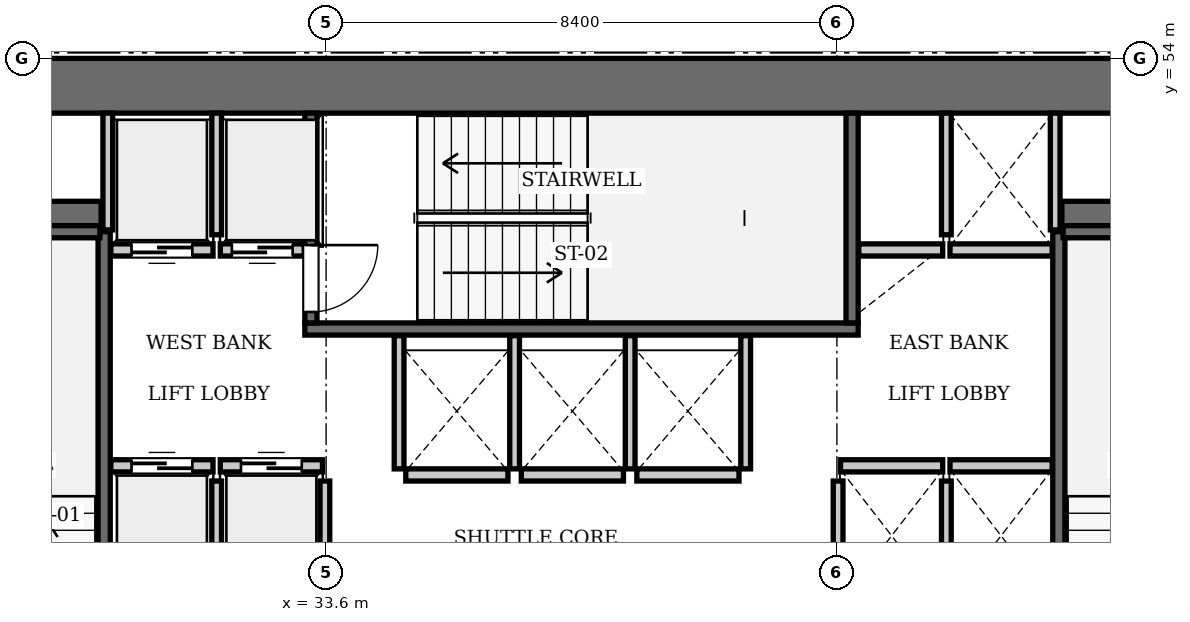
"""IFC4 building model, lengths in metres.
Left out: names, types, materials, properties, quantities, classifications, styles, units other than length and angle.
Written with IfcOpenShell. Run it as: python <this file> out.ifc"""

import sys

from ifc_helpers import new_model, si_unit, direction, frame, frame_2d, origin, place, context, subcontext, project, spatial, rectangle, extrude, element, fill, save


model = new_model("IFC4")
c1 = context("Model", 3, precision=1e-05, world=origin(), true_north=direction((0.0, 1.0)))
c2 = subcontext(c1, "Body", "Model", "MODEL_VIEW")
j1 = project(units=[si_unit("LENGTHUNIT", "METRE"), si_unit("PLANEANGLEUNIT", "RADIAN")], contexts=[c1])
p1 = place(None, origin())
s1 = spatial("IfcSite", under=j1, at=p1, CompositionType="ELEMENT")
p2 = place(p1, origin())
s2 = spatial("IfcBuilding", under=s1, at=p2, CompositionType="ELEMENT")
p3 = place(p2, frame((0.0, 0.0, 69.3)))
s3 = spatial("IfcBuildingStorey", under=s2, at=p3, CompositionType="ELEMENT", Elevation=69.3)
p4 = place(p3, frame((25.2, 53.55, 0.0), z_axis=(0.0, 0.0, 1.0), x_axis=(1.0, 0.0, 0.0)))
e1 = element("IfcWall", 1, at=p4, inside=s3, PredefinedType="SHEAR", context=c2, shape_type="SweptSolid", body=[
    extrude(rectangle(XDim=25.2, YDim=0.9, at=frame_2d((12.6, 0.0))), origin(), (0.0, 0.0, 1.0), 3.85),
])
p5 = place(p3, frame((26.1, 51.4, 0.0), z_axis=(0.0, 0.0, 1.0), x_axis=(1.0, 0.0, 0.0)))
e2 = element("IfcWall", 2, at=p5, inside=s3, PredefinedType="SHEAR", context=c2, shape_type="SweptSolid", body=[
    extrude(rectangle(XDim=3.8, YDim=0.5, at=frame_2d((1.9, 0.0))), origin(), (0.0, 0.0, 1.0), 3.85),
])
p6 = place(p3, frame((45.7, 51.4, 0.0), z_axis=(0.0, 0.0, 1.0), x_axis=(1.0, 0.0, 0.0)))
e3 = element("IfcWall", 3, at=p6, inside=s3, PredefinedType="SHEAR", context=c2, shape_type="SweptSolid", body=[
    extrude(rectangle(XDim=3.8, YDim=0.5, at=frame_2d((1.9, 0.0))), origin(), (0.0, 0.0, 1.0), 3.85),
])
p7 = place(p3, frame((29.95, 42.3, 0.0), z_axis=(0.0, 0.0, 1.0), x_axis=(0.0, 1.0, 0.0)))
e4 = element("IfcWall", 4, at=p7, inside=s3, PredefinedType="SOLIDWALL", context=c2, shape_type="SweptSolid", body=[
    extrude(rectangle(XDim=8.85, YDim=0.2, at=frame_2d((4.425, 0.0))), origin(), (0.0, 0.0, 1.0), 3.61),
])
p8 = place(p3, frame((26.38, 51.15, 0.0), z_axis=(0.0, 0.0, 1.0), x_axis=(1.0, 0.0, 0.0)))
e5 = element("IfcWall", 5, at=p8, inside=s3, PredefinedType="SOLIDWALL", context=c2, shape_type="SweptSolid", body=[
    extrude(rectangle(XDim=3.5, YDim=0.2, at=frame_2d((1.75, 0.0))), origin(), (0.0, 0.0, 1.0), 3.61),
])
p9 = place(p3, frame((33.25, 49.55, 0.0), z_axis=(0.0, 0.0, 1.0), x_axis=(1.0, 0.0, 0.0)))
e6 = element("IfcWall", 6, at=p9, inside=s3, PredefinedType="SOLIDWALL", context=c2, shape_type="SweptSolid", body=[
    extrude(rectangle(XDim=9.1, YDim=0.2, at=frame_2d((4.55, 0.0))), origin(), (0.0, 0.0, 1.0), 3.61),
])
p10 = place(p3, frame((42.25, 49.65, 0.0), z_axis=(0.0, 0.0, 1.0), x_axis=(0.0, 1.0, 0.0)))
e7 = element("IfcWall", 7, at=p10, inside=s3, PredefinedType="SOLIDWALL", context=c2, shape_type="SweptSolid", body=[
    extrude(rectangle(XDim=3.45, YDim=0.2, at=frame_2d((1.725, 0.0))), origin(), (0.0, 0.0, 1.0), 3.61),
])
p11 = place(p3, frame((33.35, 49.65, 0.0), z_axis=(0.0, 0.0, 1.0), x_axis=(0.0, 1.0, 0.0)))
e8 = element("IfcWall", 8, at=p11, inside=s3, PredefinedType="SOLIDWALL", context=c2, shape_type="SweptSolid", body=[
    extrude(rectangle(XDim=3.45, YDim=0.2, at=frame_2d((1.725, 0.0))), origin(), (0.0, 0.0, 1.0), 3.61),
])
p12 = place(p11, frame((0.18, 0.0, 0.0)))
e9 = element("IfcOpeningElement", 9, at=p12, cuts=e8, PredefinedType="OPENING", context=c2, shape_type="SweptSolid", body=[
    extrude(rectangle(XDim=1.1, YDim=2.15, at=frame_2d((0.55, 1.075))), frame((0.0, 0.11, 0.0), z_axis=(0.0, -1.0, 0.0), x_axis=(1.0, 0.0, 0.0)), (0.0, 0.0, 1.0), 0.22),
])
p13 = place(p3, frame((45.65, 42.3, 0.0), z_axis=(0.0, 0.0, 1.0), x_axis=(0.0, 1.0, 0.0)))
e10 = element("IfcWall", 10, at=p13, inside=s3, PredefinedType="SOLIDWALL", context=c2, shape_type="SweptSolid", body=[
    extrude(rectangle(XDim=8.85, YDim=0.2, at=frame_2d((4.425, 0.0))), origin(), (0.0, 0.0, 1.0), 3.61),
])
p14 = place(p3, frame((45.72, 51.15, 0.0), z_axis=(0.0, 0.0, 1.0), x_axis=(1.0, 0.0, 0.0)))
e11 = element("IfcWall", 11, at=p14, inside=s3, PredefinedType="SOLIDWALL", context=c2, shape_type="SweptSolid", body=[
    extrude(rectangle(XDim=3.5, YDim=0.2, at=frame_2d((1.75, 0.0))), origin(), (0.0, 0.0, 1.0), 3.61),
])
p15 = place(p3, frame((30.06, 47.3, 0.0), z_axis=(0.0, 0.0, 1.0), x_axis=(1.0, 0.0, 0.0)))
e12 = element("IfcWall", 12, at=p15, inside=s3, PredefinedType="SOLIDWALL", context=c2, shape_type="SweptSolid", body=[
    extrude(rectangle(XDim=1.68, YDim=0.2, at=frame_2d((0.84, 0.0))), origin(), (0.0, 0.0, 1.0), 3.61),
])
p16 = place(p15, frame((0.34, 0.0, 0.0)))
e13 = element("IfcOpeningElement", 13, at=p16, cuts=e12, PredefinedType="OPENING", context=c2, shape_type="SweptSolid", body=[
    extrude(rectangle(XDim=1.0, YDim=2.15, at=frame_2d((0.5, 1.075))), frame((0.0, 0.11, 0.0), z_axis=(0.0, -1.0, 0.0), x_axis=(1.0, 0.0, 0.0)), (0.0, 0.0, 1.0), 0.22),
])
p17 = place(p3, frame((31.86, 47.3, 0.0), z_axis=(0.0, 0.0, 1.0), x_axis=(1.0, 0.0, 0.0)))
e14 = element("IfcWall", 14, at=p17, inside=s3, PredefinedType="SOLIDWALL", context=c2, shape_type="SweptSolid", body=[
    extrude(rectangle(XDim=1.68, YDim=0.2, at=frame_2d((0.84, 0.0))), origin(), (0.0, 0.0, 1.0), 3.61),
])
p18 = place(p17, frame((0.34, 0.0, 0.0)))
e15 = element("IfcOpeningElement", 15, at=p18, cuts=e14, PredefinedType="OPENING", context=c2, shape_type="SweptSolid", body=[
    extrude(rectangle(XDim=1.0, YDim=2.15, at=frame_2d((0.5, 1.075))), frame((0.0, 0.11, 0.0), z_axis=(0.0, -1.0, 0.0), x_axis=(1.0, 0.0, 0.0)), (0.0, 0.0, 1.0), 0.22),
])
p19 = place(p3, frame((30.06, 50.85, 0.0), z_axis=(0.0, 0.0, 1.0), x_axis=(1.0, 0.0, 0.0)))
e16 = element("IfcWall", 16, at=p19, inside=s3, PredefinedType="SOLIDWALL", context=c2, shape_type="SweptSolid", body=[
    extrude(rectangle(XDim=1.68, YDim=0.2, at=frame_2d((0.84, 0.0))), origin(), (0.0, 0.0, 1.0), 3.61),
])
p20 = place(p19, frame((0.34, 0.0, 0.0)))
e17 = element("IfcOpeningElement", 17, at=p20, cuts=e16, PredefinedType="OPENING", context=c2, shape_type="SweptSolid", body=[
    extrude(rectangle(XDim=1.0, YDim=2.15, at=frame_2d((0.5, 1.075))), frame((0.0, 0.11, 0.0), z_axis=(0.0, -1.0, 0.0), x_axis=(1.0, 0.0, 0.0)), (0.0, 0.0, 1.0), 0.22),
])
p21 = place(p3, frame((31.86, 50.85, 0.0), z_axis=(0.0, 0.0, 1.0), x_axis=(1.0, 0.0, 0.0)))
e18 = element("IfcWall", 18, at=p21, inside=s3, PredefinedType="SOLIDWALL", context=c2, shape_type="SweptSolid", body=[
    extrude(rectangle(XDim=1.38, YDim=0.2, at=frame_2d((0.69, 0.0))), origin(), (0.0, 0.0, 1.0), 3.61),
])
p22 = place(p21, frame((0.19, 0.0, 0.0)))
e19 = element("IfcOpeningElement", 19, at=p22, cuts=e18, PredefinedType="OPENING", context=c2, shape_type="SweptSolid", body=[
    extrude(rectangle(XDim=1.0, YDim=2.15, at=frame_2d((0.5, 1.075))), frame((0.0, 0.11, 0.0), z_axis=(0.0, -1.0, 0.0), x_axis=(1.0, 0.0, 0.0)), (0.0, 0.0, 1.0), 0.22),
])
for number, where, z_axis, x_axis in (
    (20, (42.06, 47.3, 0.0), (0.0, 0.0, 1.0), (1.0, 0.0, 0.0)),
    (21, (43.86, 47.3, 0.0), (0.0, 0.0, 1.0), (1.0, 0.0, 0.0)),
):
    element("IfcWall", number, at=place(p3, frame(where, z_axis=z_axis, x_axis=x_axis)), inside=s3, PredefinedType="SOLIDWALL", context=c2, shape_type="SweptSolid", body=[
        extrude(rectangle(XDim=1.68, YDim=0.2, at=frame_2d((0.84, 0.0))), origin(), (0.0, 0.0, 1.0), 3.61),
    ])
p23 = place(p3, frame((42.36, 50.85, 0.0), z_axis=(0.0, 0.0, 1.0), x_axis=(1.0, 0.0, 0.0)))
e22 = element("IfcWall", 22, at=p23, inside=s3, PredefinedType="SOLIDWALL", context=c2, shape_type="SweptSolid", body=[
    extrude(rectangle(XDim=1.38, YDim=0.2, at=frame_2d((0.69, 0.0))), origin(), (0.0, 0.0, 1.0), 3.61),
])
p24 = place(p3, frame((43.86, 50.85, 0.0), z_axis=(0.0, 0.0, 1.0), x_axis=(1.0, 0.0, 0.0)))
e23 = element("IfcWall", 23, at=p24, inside=s3, PredefinedType="SOLIDWALL", context=c2, shape_type="SweptSolid", body=[
    extrude(rectangle(XDim=1.68, YDim=0.2, at=frame_2d((0.84, 0.0))), origin(), (0.0, 0.0, 1.0), 3.61),
])
p25 = place(p3, frame((34.91, 47.15, 0.0), z_axis=(0.0, 0.0, 1.0), x_axis=(1.0, 0.0, 0.0)))
e24 = element("IfcWall", 24, at=p25, inside=s3, PredefinedType="SOLIDWALL", context=c2, shape_type="SweptSolid", body=[
    extrude(rectangle(XDim=1.68, YDim=0.2, at=frame_2d((0.84, 0.0))), origin(), (0.0, 0.0, 1.0), 3.61),
])
for number, where, z_axis, x_axis in (
    (25, (36.81, 47.15, 0.0), (0.0, 0.0, 1.0), (1.0, 0.0, 0.0)),
    (26, (38.71, 47.15, 0.0), (0.0, 0.0, 1.0), (1.0, 0.0, 0.0)),
):
    element("IfcWall", number, at=place(p3, frame(where, z_axis=z_axis, x_axis=x_axis)), inside=s3, PredefinedType="SOLIDWALL", context=c2, shape_type="SweptSolid", body=[
        extrude(rectangle(XDim=1.68, YDim=0.2, at=frame_2d((0.84, 0.0))), origin(), (0.0, 0.0, 1.0), 3.61),
    ])
for number, where, z_axis, x_axis in (
    (27, (31.8, 45.1, 0.0), (0.0, 0.0, 1.0), (0.0, 1.0, 0.0)),
    (28, (33.58, 45.1, 0.0), (0.0, 0.0, 1.0), (0.0, 1.0, 0.0)),
):
    element("IfcWall", number, at=place(p3, frame(where, z_axis=z_axis, x_axis=x_axis)), inside=s3, PredefinedType="SOLIDWALL", context=c2, shape_type="SweptSolid", body=[
        extrude(rectangle(XDim=1.95, YDim=0.16, at=frame_2d((0.975, 0.0))), origin(), (0.0, 0.0, 1.0), 3.61),
    ])
p26 = place(p3, frame((30.01, 51.18, 0.0), z_axis=(0.0, 0.0, 1.0), x_axis=(0.0, 1.0, 0.0)))
e29 = element("IfcWall", 29, at=p26, inside=s3, PredefinedType="SOLIDWALL", context=c2, shape_type="SweptSolid", body=[
    extrude(rectangle(XDim=1.92, YDim=0.16, at=frame_2d((0.96, 0.0))), origin(), (0.0, 0.0, 1.0), 3.61),
])
p27 = place(p3, frame((31.8, 51.1, 0.0), z_axis=(0.0, 0.0, 1.0), x_axis=(0.0, 1.0, 0.0)))
e30 = element("IfcWall", 30, at=p27, inside=s3, PredefinedType="SOLIDWALL", context=c2, shape_type="SweptSolid", body=[
    extrude(rectangle(XDim=2.0, YDim=0.16, at=frame_2d((1.0, 0.0))), origin(), (0.0, 0.0, 1.0), 3.61),
])
for number, where, z_axis, x_axis in (
    (31, (42.02, 45.1, 0.0), (0.0, 0.0, 1.0), (0.0, 1.0, 0.0)),
    (32, (43.8, 45.1, 0.0), (0.0, 0.0, 1.0), (0.0, 1.0, 0.0)),
):
    element("IfcWall", number, at=place(p3, frame(where, z_axis=z_axis, x_axis=x_axis)), inside=s3, PredefinedType="SOLIDWALL", context=c2, shape_type="SweptSolid", body=[
        extrude(rectangle(XDim=1.95, YDim=0.16, at=frame_2d((0.975, 0.0))), origin(), (0.0, 0.0, 1.0), 3.61),
    ])
p28 = place(p3, frame((45.59, 51.18, 0.0), z_axis=(0.0, 0.0, 1.0), x_axis=(0.0, 1.0, 0.0)))
e33 = element("IfcWall", 33, at=p28, inside=s3, PredefinedType="SOLIDWALL", context=c2, shape_type="SweptSolid", body=[
    extrude(rectangle(XDim=1.92, YDim=0.16, at=frame_2d((0.96, 0.0))), origin(), (0.0, 0.0, 1.0), 3.61),
])
p29 = place(p3, frame((43.8, 51.1, 0.0), z_axis=(0.0, 0.0, 1.0), x_axis=(0.0, 1.0, 0.0)))
e34 = element("IfcWall", 34, at=p29, inside=s3, PredefinedType="SOLIDWALL", context=c2, shape_type="SweptSolid", body=[
    extrude(rectangle(XDim=2.0, YDim=0.16, at=frame_2d((1.0, 0.0))), origin(), (0.0, 0.0, 1.0), 3.61),
])
for number, where, z_axis, x_axis in (
    (35, (34.8, 47.25, 0.0), (0.0, 0.0, 1.0), (0.0, 1.0, 0.0)),
    (36, (36.7, 47.25, 0.0), (0.0, 0.0, 1.0), (0.0, 1.0, 0.0)),
    (37, (38.6, 47.25, 0.0), (0.0, 0.0, 1.0), (0.0, 1.0, 0.0)),
    (38, (40.5, 47.25, 0.0), (0.0, 0.0, 1.0), (0.0, 1.0, 0.0)),
):
    element("IfcWall", number, at=place(p3, frame(where, z_axis=z_axis, x_axis=x_axis)), inside=s3, PredefinedType="SOLIDWALL", context=c2, shape_type="SweptSolid", body=[
        extrude(rectangle(XDim=2.19, YDim=0.16, at=frame_2d((1.095, 0.0))), origin(), (0.0, 0.0, 1.0), 3.61),
    ])
p30 = place(p12, frame((1.1, 0.0, 0.0), z_axis=(0.0, 0.0, 1.0), x_axis=(-1.0, 0.0, 0.0)))
e39 = element("IfcDoor", 39, at=p30, inside=s3, OperationType="SINGLE_SWING_LEFT", PredefinedType="DOOR", context=c2, shape_type="SweptSolid", body=[
    extrude(rectangle(XDim=1.1, YDim=2.15, at=frame_2d((0.55, 1.075))), frame((0.0, 0.025, 0.0), z_axis=(0.0, -1.0, 0.0), x_axis=(1.0, 0.0, 0.0)), (0.0, 0.0, 1.0), 0.05),
])
fill(e9, e39)
p31 = place(p16, origin())
e40 = element("IfcDoor", 40, at=p31, inside=s3, OperationType="SLIDING_TO_LEFT", PredefinedType="DOOR", context=c2, shape_type="SweptSolid", body=[
    extrude(rectangle(XDim=1.0, YDim=2.15, at=frame_2d((0.5, 1.075))), frame((0.0, 0.025, 0.0), z_axis=(0.0, -1.0, 0.0), x_axis=(1.0, 0.0, 0.0)), (0.0, 0.0, 1.0), 0.05),
])
fill(e13, e40)
p32 = place(p18, origin())
e41 = element("IfcDoor", 41, at=p32, inside=s3, OperationType="SLIDING_TO_LEFT", PredefinedType="DOOR", context=c2, shape_type="SweptSolid", body=[
    extrude(rectangle(XDim=1.0, YDim=2.15, at=frame_2d((0.5, 1.075))), frame((0.0, 0.025, 0.0), z_axis=(0.0, -1.0, 0.0), x_axis=(1.0, 0.0, 0.0)), (0.0, 0.0, 1.0), 0.05),
])
fill(e15, e41)
p33 = place(p20, frame((1.0, 0.0, 0.0), z_axis=(0.0, 0.0, 1.0), x_axis=(-1.0, 0.0, 0.0)))
e42 = element("IfcDoor", 42, at=p33, inside=s3, OperationType="SLIDING_TO_LEFT", PredefinedType="DOOR", context=c2, shape_type="SweptSolid", body=[
    extrude(rectangle(XDim=1.0, YDim=2.15, at=frame_2d((0.5, 1.075))), frame((0.0, 0.025, 0.0), z_axis=(0.0, -1.0, 0.0), x_axis=(1.0, 0.0, 0.0)), (0.0, 0.0, 1.0), 0.05),
])
fill(e17, e42)
p34 = place(p22, frame((1.0, 0.0, 0.0), z_axis=(0.0, 0.0, 1.0), x_axis=(-1.0, 0.0, 0.0)))
e43 = element("IfcDoor", 43, at=p34, inside=s3, OperationType="SLIDING_TO_LEFT", PredefinedType="DOOR", context=c2, shape_type="SweptSolid", body=[
    extrude(rectangle(XDim=1.0, YDim=2.15, at=frame_2d((0.5, 1.075))), frame((0.0, 0.025, 0.0), z_axis=(0.0, -1.0, 0.0), x_axis=(1.0, 0.0, 0.0)), (0.0, 0.0, 1.0), 0.05),
])
fill(e19, e43)
save(model, sys.argv[1])
